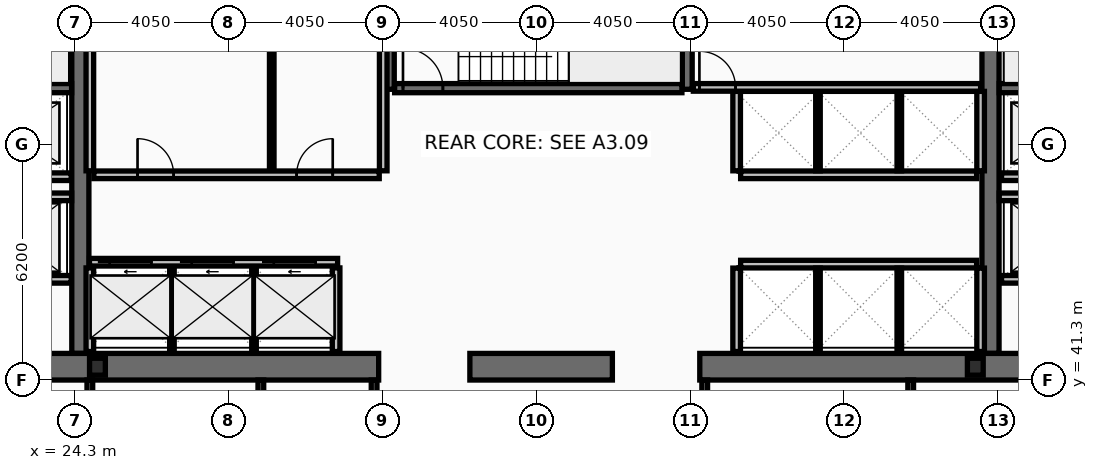
"""IFC4 building model, lengths in metres.
Left out: names, types, materials, properties, quantities, classifications, styles, units other than length and angle.
Written with IfcOpenShell. Run it as: python <this file> out.ifc"""

import sys

from ifc_helpers import new_model, si_unit, direction, frame, frame_2d, origin, origin_2d, place, context, subcontext, project, spatial, rectangle, i_section, extrude, element, fill, save


model = new_model("IFC4")
c1 = context("Model", 3, precision=1e-05, world=origin(), true_north=direction((0.0, 1.0)))
c2 = subcontext(c1, "Body", "Model", "MODEL_VIEW")
j1 = project(units=[si_unit("LENGTHUNIT", "METRE"), si_unit("PLANEANGLEUNIT", "RADIAN")], contexts=[c1])
p1 = place(None, origin())
s1 = spatial("IfcSite", under=j1, at=p1, CompositionType="ELEMENT")
p2 = place(p1, origin())
s2 = spatial("IfcBuilding", under=s1, at=p2, CompositionType="ELEMENT")
p3 = place(p2, frame((0.0, 0.0, 165.0)))
s3 = spatial("IfcBuildingStorey", under=s2, at=p3, CompositionType="ELEMENT", Elevation=165.0)
for number, where, z_axis, x_axis in (
    (1, (24.45, 42.0, 0.0), (0.0, 0.0, 1.0), (0.0, 1.0, 0.0)),
    (2, (48.4, 42.0, 0.0), (0.0, 0.0, 1.0), (0.0, 1.0, 0.0)),
):
    element("IfcWall", number, at=place(p3, frame(where, z_axis=z_axis, x_axis=x_axis)), inside=s3, PredefinedType="SHEAR", context=c2, shape_type="SweptSolid", body=[
        extrude(rectangle(XDim=11.0, YDim=0.45, at=frame_2d((5.5, 0.0))), origin(), (0.0, 0.0, 1.0), 3.44),
    ])
p4 = place(p3, frame((32.3, 41.65, 0.0), z_axis=(0.0, 0.0, 1.0), x_axis=(-1.0, 0.0, 0.0)))
e3 = element("IfcWall", 3, at=p4, inside=s3, PredefinedType="SHEAR", context=c2, shape_type="SweptSolid", body=[
    extrude(rectangle(XDim=11.45, YDim=0.7, at=frame_2d((5.725, 0.0))), origin(), (0.0, 0.0, 1.0), 3.44),
])
p5 = place(p3, frame((38.45, 41.65, 0.0), z_axis=(0.0, 0.0, 1.0), x_axis=(-1.0, 0.0, 0.0)))
e4 = element("IfcWall", 4, at=p5, inside=s3, PredefinedType="SHEAR", context=c2, shape_type="SweptSolid", body=[
    extrude(rectangle(XDim=3.75, YDim=0.7, at=frame_2d((1.875, 0.0))), origin(), (0.0, 0.0, 1.0), 3.44),
])
p6 = place(p3, frame((52.05, 41.65, 0.0), z_axis=(0.0, 0.0, 1.0), x_axis=(-1.0, 0.0, 0.0)))
e5 = element("IfcWall", 5, at=p6, inside=s3, PredefinedType="SHEAR", context=c2, shape_type="SweptSolid", body=[
    extrude(rectangle(XDim=11.3, YDim=0.7, at=frame_2d((5.65, 0.0))), origin(), (0.0, 0.0, 1.0), 3.44),
])
for number, where, z_axis, x_axis in (
    (6, (32.58, 48.95, 0.0), (0.0, 0.0, 1.0), (0.0, 1.0, 0.0)),
    (7, (40.42, 48.95, 0.0), (0.0, 0.0, 1.0), (0.0, 1.0, 0.0)),
):
    element("IfcWall", number, at=place(p3, frame(where, z_axis=z_axis, x_axis=x_axis)), inside=s3, PredefinedType="SHEAR", context=c2, shape_type="SweptSolid", body=[
        extrude(rectangle(XDim=4.05, YDim=0.26, at=frame_2d((2.025, 0.0))), origin(), (0.0, 0.0, 1.0), 3.44),
    ])
p7 = place(p3, frame((16.9, 48.98, 0.0), z_axis=(0.0, 0.0, 1.0), x_axis=(1.0, 0.0, 0.0)))
e8 = element("IfcWall", 8, at=p7, inside=s3, PredefinedType="SHEAR", context=c2, shape_type="SweptSolid", body=[
    extrude(rectangle(XDim=7.32, YDim=0.24, at=frame_2d((3.66, 0.0))), origin(), (0.0, 0.0, 1.0), 3.44),
])
p8 = place(p7, frame((0.22, 0.0, 0.0)))
e9 = element("IfcOpeningElement", 9, at=p8, cuts=e8, PredefinedType="OPENING", context=c2, shape_type="SweptSolid", body=[
    extrude(rectangle(XDim=1.05, YDim=2.15, at=frame_2d((0.525, 1.075))), frame((0.0, 0.13, 0.0), z_axis=(0.0, -1.0, 0.0), x_axis=(1.0, 0.0, 0.0)), (0.0, 0.0, 1.0), 0.26),
])
p9 = place(p3, frame((48.63, 48.98, 0.0), z_axis=(0.0, 0.0, 1.0), x_axis=(1.0, 0.0, 0.0)))
e10 = element("IfcWall", 10, at=p9, inside=s3, PredefinedType="SHEAR", context=c2, shape_type="SweptSolid", body=[
    extrude(rectangle(XDim=7.37, YDim=0.24, at=frame_2d((3.685, 0.0))), origin(), (0.0, 0.0, 1.0), 3.44),
])
p10 = place(p9, frame((6.1, 0.0, 0.0)))
e11 = element("IfcOpeningElement", 11, at=p10, cuts=e10, PredefinedType="OPENING", context=c2, shape_type="SweptSolid", body=[
    extrude(rectangle(XDim=1.05, YDim=2.15, at=frame_2d((0.525, 1.075))), frame((0.0, 0.13, 0.0), z_axis=(0.0, -1.0, 0.0), x_axis=(1.0, 0.0, 0.0)), (0.0, 0.0, 1.0), 0.26),
])
p11 = place(p3, frame((32.72, 48.98, 0.0), z_axis=(0.0, 0.0, 1.0), x_axis=(1.0, 0.0, 0.0)))
e12 = element("IfcWall", 12, at=p11, inside=s3, PredefinedType="SHEAR", context=c2, shape_type="SweptSolid", body=[
    extrude(rectangle(XDim=7.56, YDim=0.24, at=frame_2d((3.78, 0.0))), origin(), (0.0, 0.0, 1.0), 3.44),
])
p12 = place(p11, frame((0.22, 0.0, 0.0)))
e13 = element("IfcOpeningElement", 13, at=p12, cuts=e12, PredefinedType="OPENING", context=c2, shape_type="SweptSolid", body=[
    extrude(rectangle(XDim=1.05, YDim=2.15, at=frame_2d((0.525, 1.075))), frame((0.0, 0.13, 0.0), z_axis=(0.0, -1.0, 0.0), x_axis=(1.0, 0.0, 0.0)), (0.0, 0.0, 1.0), 0.26),
])
for number, where, z_axis, x_axis in (
    (14, (24.9, 41.65, 0.0), (0.0, 0.0, 1.0), (1.0, 0.0, 0.0)),
    (15, (48.0, 41.65, 0.0), (0.0, 0.0, 1.0), (1.0, 0.0, 0.0)),
):
    element("IfcColumn", number, at=place(p3, frame(where, z_axis=z_axis, x_axis=x_axis)), inside=s3, PredefinedType="COLUMN", context=c2, shape_type="SweptSolid", body=[
        extrude(i_section(OverallWidth=0.416, OverallDepth=0.446, WebThickness=0.039, FlangeThickness=0.063, at=origin_2d()), origin(), (0.0, 0.0, 1.0), 3.6),
    ])
p13 = place(p3, frame((24.69, 44.4, 0.0), z_axis=(0.0, 0.0, 1.0), x_axis=(1.0, 0.0, 0.0)))
e16 = element("IfcWall", 16, at=p13, inside=s3, PredefinedType="PARTITIONING", context=c2, shape_type="SweptSolid", body=[
    extrude(rectangle(XDim=6.53, YDim=0.2, at=frame_2d((3.265, 0.0))), origin(), (0.0, 0.0, 1.0), 3.44),
])
p14 = place(p13, frame((0.53, 0.0, 0.0)))
e17 = element("IfcOpeningElement", 17, at=p14, cuts=e16, PredefinedType="OPENING", context=c2, shape_type="SweptSolid", body=[
    extrude(rectangle(XDim=1.1, YDim=2.18, at=frame_2d((0.55, 1.09))), frame((0.0, 0.11, 0.0), z_axis=(0.0, -1.0, 0.0), x_axis=(1.0, 0.0, 0.0)), (0.0, 0.0, 1.0), 0.22),
])
p15 = place(p13, frame((2.69, 0.0, 0.0)))
e18 = element("IfcOpeningElement", 18, at=p15, cuts=e16, PredefinedType="OPENING", context=c2, shape_type="SweptSolid", body=[
    extrude(rectangle(XDim=1.1, YDim=2.18, at=frame_2d((0.55, 1.09))), frame((0.0, 0.11, 0.0), z_axis=(0.0, -1.0, 0.0), x_axis=(1.0, 0.0, 0.0)), (0.0, 0.0, 1.0), 0.22),
])
p16 = place(p13, frame((4.85, 0.0, 0.0)))
e19 = element("IfcOpeningElement", 19, at=p16, cuts=e16, PredefinedType="OPENING", context=c2, shape_type="SweptSolid", body=[
    extrude(rectangle(XDim=1.1, YDim=2.18, at=frame_2d((0.55, 1.09))), frame((0.0, 0.11, 0.0), z_axis=(0.0, -1.0, 0.0), x_axis=(1.0, 0.0, 0.0)), (0.0, 0.0, 1.0), 0.22),
])
p17 = place(p3, frame((51.61, 43.95, 0.0), z_axis=(0.0, 0.0, 1.0), x_axis=(-1.0, 0.0, 0.0)))
e20 = element("IfcWall", 20, at=p17, inside=s3, PredefinedType="PARTITIONING", context=c2, shape_type="SweptSolid", body=[
    extrude(rectangle(XDim=2.92, YDim=0.2, at=frame_2d((1.46, 0.0))), origin(), (0.0, 0.0, 1.0), 3.44),
])
p18 = place(p17, frame((0.81, 0.0, 0.0)))
e21 = element("IfcOpeningElement", 21, at=p18, cuts=e20, PredefinedType="OPENING", context=c2, shape_type="SweptSolid", body=[
    extrude(rectangle(XDim=1.3, YDim=2.18, at=frame_2d((0.65, 1.09))), frame((0.0, 0.11, 0.0), z_axis=(0.0, -1.0, 0.0), x_axis=(1.0, 0.0, 0.0)), (0.0, 0.0, 1.0), 0.22),
])
p19 = place(p3, frame((24.21, 43.95, 0.0), z_axis=(0.0, 0.0, 1.0), x_axis=(-1.0, 0.0, 0.0)))
e22 = element("IfcWall", 22, at=p19, inside=s3, PredefinedType="PARTITIONING", context=c2, shape_type="SweptSolid", body=[
    extrude(rectangle(XDim=2.97, YDim=0.2, at=frame_2d((1.485, 0.0))), origin(), (0.0, 0.0, 1.0), 3.44),
])
p20 = place(p19, frame((0.86, 0.0, 0.0)))
e23 = element("IfcOpeningElement", 23, at=p20, cuts=e22, PredefinedType="OPENING", context=c2, shape_type="SweptSolid", body=[
    extrude(rectangle(XDim=1.3, YDim=2.18, at=frame_2d((0.65, 1.09))), frame((0.0, 0.11, 0.0), z_axis=(0.0, -1.0, 0.0), x_axis=(1.0, 0.0, 0.0)), (0.0, 0.0, 1.0), 0.22),
])
p21 = place(p3, frame((51.61, 46.65, 0.0), z_axis=(0.0, 0.0, 1.0), x_axis=(-1.0, 0.0, 0.0)))
e24 = element("IfcWall", 24, at=p21, inside=s3, PredefinedType="PARTITIONING", context=c2, shape_type="SweptSolid", body=[
    extrude(rectangle(XDim=2.92, YDim=0.2, at=frame_2d((1.46, 0.0))), origin(), (0.0, 0.0, 1.0), 3.44),
])
p22 = place(p21, frame((0.86, 0.0, 0.0)))
e25 = element("IfcOpeningElement", 25, at=p22, cuts=e24, PredefinedType="OPENING", context=c2, shape_type="SweptSolid", body=[
    extrude(rectangle(XDim=1.2, YDim=2.18, at=frame_2d((0.6, 1.09))), frame((0.0, 0.11, 0.0), z_axis=(0.0, -1.0, 0.0), x_axis=(1.0, 0.0, 0.0)), (0.0, 0.0, 1.0), 0.22),
])
p23 = place(p3, frame((24.21, 46.65, 0.0), z_axis=(0.0, 0.0, 1.0), x_axis=(-1.0, 0.0, 0.0)))
e26 = element("IfcWall", 26, at=p23, inside=s3, PredefinedType="PARTITIONING", context=c2, shape_type="SweptSolid", body=[
    extrude(rectangle(XDim=2.97, YDim=0.2, at=frame_2d((1.485, 0.0))), origin(), (0.0, 0.0, 1.0), 3.44),
])
p24 = place(p23, frame((0.91, 0.0, 0.0)))
e27 = element("IfcOpeningElement", 27, at=p24, cuts=e26, PredefinedType="OPENING", context=c2, shape_type="SweptSolid", body=[
    extrude(rectangle(XDim=1.2, YDim=2.18, at=frame_2d((0.6, 1.09))), frame((0.0, 0.11, 0.0), z_axis=(0.0, -1.0, 0.0), x_axis=(1.0, 0.0, 0.0)), (0.0, 0.0, 1.0), 0.22),
])
p25 = place(p3, frame((21.2, 46.12, 0.0), z_axis=(0.0, 0.0, 1.0), x_axis=(1.0, 0.0, 0.0)))
e28 = element("IfcWall", 28, at=p25, inside=s3, PredefinedType="PARTITIONING", context=c2, shape_type="SweptSolid", body=[
    extrude(rectangle(XDim=3.02, YDim=0.2, at=frame_2d((1.51, 0.0))), origin(), (0.0, 0.0, 1.0), 3.44),
])
p26 = place(p3, frame((48.63, 46.12, 0.0), z_axis=(0.0, 0.0, 1.0), x_axis=(1.0, 0.0, 0.0)))
e29 = element("IfcWall", 29, at=p26, inside=s3, PredefinedType="PARTITIONING", context=c2, shape_type="SweptSolid", body=[
    extrude(rectangle(XDim=3.07, YDim=0.2, at=frame_2d((1.535, 0.0))), origin(), (0.0, 0.0, 1.0), 3.44),
])
for number, where, z_axis, x_axis in (
    (30, (24.7, 46.805, 0.0), (0.0, 0.0, 1.0), (0.0, 1.0, 0.0)),
    (31, (32.42, 46.805, 0.0), (0.0, 0.0, 1.0), (0.0, 1.0, 0.0)),
):
    element("IfcWall", number, at=place(p3, frame(where, z_axis=z_axis, x_axis=x_axis)), inside=s3, PredefinedType="PARTITIONING", context=c2, shape_type="SweptSolid", body=[
        extrude(rectangle(XDim=5.99, YDim=0.2, at=frame_2d((2.995, 0.0))), origin(), (0.0, 0.0, 1.0), 3.44),
    ])
p27 = place(p3, frame((29.486, 46.805, 0.0), z_axis=(0.0, 0.0, 1.0), x_axis=(0.0, 1.0, 0.0)))
e32 = element("IfcWall", 32, at=p27, inside=s3, PredefinedType="PARTITIONING", context=c2, shape_type="SweptSolid", body=[
    extrude(rectangle(XDim=5.99, YDim=0.12, at=frame_2d((2.995, 0.0))), origin(), (0.0, 0.0, 1.0), 3.44),
])
p28 = place(p3, frame((24.805, 46.7, 0.0), z_axis=(0.0, 0.0, 1.0), x_axis=(1.0, 0.0, 0.0)))
e33 = element("IfcWall", 33, at=p28, inside=s3, PredefinedType="PARTITIONING", context=c2, shape_type="SweptSolid", body=[
    extrude(rectangle(XDim=7.51, YDim=0.2, at=frame_2d((3.755, 0.0))), origin(), (0.0, 0.0, 1.0), 3.44),
])
p29 = place(p28, frame((1.15, 0.0, 0.0)))
e34 = element("IfcOpeningElement", 34, at=p29, cuts=e33, PredefinedType="OPENING", context=c2, shape_type="SweptSolid", body=[
    extrude(rectangle(XDim=0.95, YDim=2.1, at=frame_2d((0.475, 1.05))), frame((0.0, 0.11, 0.0), z_axis=(0.0, -1.0, 0.0), x_axis=(1.0, 0.0, 0.0)), (0.0, 0.0, 1.0), 0.22),
])
p30 = place(p28, frame((5.336, 0.0, 0.0)))
e35 = element("IfcOpeningElement", 35, at=p30, cuts=e33, PredefinedType="OPENING", context=c2, shape_type="SweptSolid", body=[
    extrude(rectangle(XDim=0.95, YDim=2.1, at=frame_2d((0.475, 1.05))), frame((0.0, 0.11, 0.0), z_axis=(0.0, -1.0, 0.0), x_axis=(1.0, 0.0, 0.0)), (0.0, 0.0, 1.0), 0.22),
])
for number, where, z_axis, x_axis in (
    (36, (24.7, 42.05, 0.0), (0.0, 0.0, 1.0), (0.0, 1.0, 0.0)),
    (37, (31.18, 42.05, 0.0), (0.0, 0.0, 1.0), (0.0, 1.0, 0.0)),
):
    element("IfcWall", number, at=place(p3, frame(where, z_axis=z_axis, x_axis=x_axis)), inside=s3, PredefinedType="PARTITIONING", context=c2, shape_type="SweptSolid", body=[
        extrude(rectangle(XDim=2.2, YDim=0.2, at=frame_2d((1.1, 0.0))), origin(), (0.0, 0.0, 1.0), 3.44),
    ])
for number, where, z_axis, x_axis in (
    (38, (26.86, 42.05, 0.0), (0.0, 0.0, 1.0), (0.0, 1.0, 0.0)),
    (39, (29.02, 42.05, 0.0), (0.0, 0.0, 1.0), (0.0, 1.0, 0.0)),
):
    element("IfcWall", number, at=place(p3, frame(where, z_axis=z_axis, x_axis=x_axis)), inside=s3, PredefinedType="PARTITIONING", context=c2, shape_type="SweptSolid", body=[
        extrude(rectangle(XDim=2.2, YDim=0.12, at=frame_2d((1.1, 0.0))), origin(), (0.0, 0.0, 1.0), 3.44),
    ])
p31 = place(p3, frame((41.825, 46.7, 0.0), z_axis=(0.0, 0.0, 1.0), x_axis=(1.0, 0.0, 0.0)))
e40 = element("IfcWall", 40, at=p31, inside=s3, PredefinedType="PARTITIONING", context=c2, shape_type="SweptSolid", body=[
    extrude(rectangle(XDim=6.21, YDim=0.2, at=frame_2d((3.105, 0.0))), origin(), (0.0, 0.0, 1.0), 3.44),
])
for number, where, z_axis, x_axis in (
    (41, (41.72, 46.805, 0.0), (0.0, 0.0, 1.0), (0.0, 1.0, 0.0)),
    (42, (48.14, 46.805, 0.0), (0.0, 0.0, 1.0), (0.0, 1.0, 0.0)),
):
    element("IfcWall", number, at=place(p3, frame(where, z_axis=z_axis, x_axis=x_axis)), inside=s3, PredefinedType="PARTITIONING", context=c2, shape_type="SweptSolid", body=[
        extrude(rectangle(XDim=2.09, YDim=0.2, at=frame_2d((1.045, 0.0))), origin(), (0.0, 0.0, 1.0), 3.44),
    ])
for number, where, z_axis, x_axis in (
    (43, (43.86, 46.805, 0.0), (0.0, 0.0, 1.0), (0.0, 1.0, 0.0)),
    (44, (46.0, 46.805, 0.0), (0.0, 0.0, 1.0), (0.0, 1.0, 0.0)),
):
    element("IfcWall", number, at=place(p3, frame(where, z_axis=z_axis, x_axis=x_axis)), inside=s3, PredefinedType="PARTITIONING", context=c2, shape_type="SweptSolid", body=[
        extrude(rectangle(XDim=2.09, YDim=0.12, at=frame_2d((1.045, 0.0))), origin(), (0.0, 0.0, 1.0), 3.44),
    ])
p32 = place(p3, frame((41.825, 44.35, 0.0), z_axis=(0.0, 0.0, 1.0), x_axis=(1.0, 0.0, 0.0)))
e45 = element("IfcWall", 45, at=p32, inside=s3, PredefinedType="PARTITIONING", context=c2, shape_type="SweptSolid", body=[
    extrude(rectangle(XDim=6.21, YDim=0.2, at=frame_2d((3.105, 0.0))), origin(), (0.0, 0.0, 1.0), 3.44),
])
for number, where, z_axis, x_axis in (
    (46, (41.72, 42.05, 0.0), (0.0, 0.0, 1.0), (0.0, 1.0, 0.0)),
    (47, (48.14, 42.05, 0.0), (0.0, 0.0, 1.0), (0.0, 1.0, 0.0)),
):
    element("IfcWall", number, at=place(p3, frame(where, z_axis=z_axis, x_axis=x_axis)), inside=s3, PredefinedType="PARTITIONING", context=c2, shape_type="SweptSolid", body=[
        extrude(rectangle(XDim=2.195, YDim=0.2, at=frame_2d((1.098, 0.0))), origin(), (0.0, 0.0, 1.0), 3.44),
    ])
for number, where, z_axis, x_axis in (
    (48, (43.86, 42.05, 0.0), (0.0, 0.0, 1.0), (0.0, 1.0, 0.0)),
    (49, (46.0, 42.05, 0.0), (0.0, 0.0, 1.0), (0.0, 1.0, 0.0)),
):
    element("IfcWall", number, at=place(p3, frame(where, z_axis=z_axis, x_axis=x_axis)), inside=s3, PredefinedType="PARTITIONING", context=c2, shape_type="SweptSolid", body=[
        extrude(rectangle(XDim=2.195, YDim=0.12, at=frame_2d((1.098, 0.0))), origin(), (0.0, 0.0, 1.0), 3.44),
    ])
p33 = place(p3, frame((40.58, 49.0, 0.0), z_axis=(0.0, 0.0, 1.0), x_axis=(1.0, 0.0, 0.0)))
e50 = element("IfcWall", 50, at=p33, inside=s3, PredefinedType="PARTITIONING", context=c2, shape_type="SweptSolid", body=[
    extrude(rectangle(XDim=7.56, YDim=0.2, at=frame_2d((3.78, 0.0))), origin(), (0.0, 0.0, 1.0), 3.44),
])
p34 = place(p33, frame((0.16, 0.0, 0.0)))
e51 = element("IfcOpeningElement", 51, at=p34, cuts=e50, PredefinedType="OPENING", context=c2, shape_type="SweptSolid", body=[
    extrude(rectangle(XDim=0.95, YDim=2.1, at=frame_2d((0.475, 1.05))), frame((0.0, 0.11, 0.0), z_axis=(0.0, -1.0, 0.0), x_axis=(1.0, 0.0, 0.0)), (0.0, 0.0, 1.0), 0.22),
])
p35 = place(p3, frame((24.7, 38.28, 0.0), z_axis=(0.0, 0.0, 1.0), x_axis=(0.0, 1.0, 0.0)))
e52 = element("IfcWall", 52, at=p35, inside=s3, PredefinedType="PARTITIONING", context=c2, shape_type="SweptSolid", body=[
    extrude(rectangle(XDim=3.02, YDim=0.15, at=frame_2d((1.51, 0.0))), origin(), (0.0, 0.0, 1.0), 2.73),
])
for number, where, z_axis, x_axis in (
    (53, (29.2, 38.28, 0.0), (0.0, 0.0, 1.0), (0.0, 1.0, 0.0)),
    (54, (32.18, 38.28, 0.0), (0.0, 0.0, 1.0), (0.0, 1.0, 0.0)),
    (55, (40.88, 38.28, 0.0), (0.0, 0.0, 1.0), (0.0, 1.0, 0.0)),
    (56, (46.3, 38.28, 0.0), (0.0, 0.0, 1.0), (0.0, 1.0, 0.0)),
):
    element("IfcWall", number, at=place(p3, frame(where, z_axis=z_axis, x_axis=x_axis)), inside=s3, PredefinedType="PARTITIONING", context=c2, shape_type="SweptSolid", body=[
        extrude(rectangle(XDim=3.02, YDim=0.15, at=frame_2d((1.51, 0.0))), origin(), (0.0, 0.0, 1.0), 3.44),
    ])
p36 = place(p12, origin())
e57 = element("IfcDoor", 57, at=p36, inside=s3, OperationType="SINGLE_SWING_LEFT", PredefinedType="DOOR", context=c2, shape_type="SweptSolid", body=[
    extrude(rectangle(XDim=1.05, YDim=2.15, at=frame_2d((0.525, 1.075))), frame((0.0, 0.025, 0.0), z_axis=(0.0, -1.0, 0.0), x_axis=(1.0, 0.0, 0.0)), (0.0, 0.0, 1.0), 0.05),
])
fill(e13, e57)
p37 = place(p14, origin())
e58 = element("IfcDoor", 58, at=p37, inside=s3, OperationType="SLIDING_TO_LEFT", PredefinedType="DOOR", context=c2, shape_type="SweptSolid", body=[
    extrude(rectangle(XDim=1.1, YDim=2.18, at=frame_2d((0.55, 1.09))), frame((0.0, 0.025, 0.0), z_axis=(0.0, -1.0, 0.0), x_axis=(1.0, 0.0, 0.0)), (0.0, 0.0, 1.0), 0.05),
])
fill(e17, e58)
p38 = place(p15, origin())
e59 = element("IfcDoor", 59, at=p38, inside=s3, OperationType="SLIDING_TO_LEFT", PredefinedType="DOOR", context=c2, shape_type="SweptSolid", body=[
    extrude(rectangle(XDim=1.1, YDim=2.18, at=frame_2d((0.55, 1.09))), frame((0.0, 0.025, 0.0), z_axis=(0.0, -1.0, 0.0), x_axis=(1.0, 0.0, 0.0)), (0.0, 0.0, 1.0), 0.05),
])
fill(e18, e59)
p39 = place(p16, origin())
e60 = element("IfcDoor", 60, at=p39, inside=s3, OperationType="SLIDING_TO_LEFT", PredefinedType="DOOR", context=c2, shape_type="SweptSolid", body=[
    extrude(rectangle(XDim=1.1, YDim=2.18, at=frame_2d((0.55, 1.09))), frame((0.0, 0.025, 0.0), z_axis=(0.0, -1.0, 0.0), x_axis=(1.0, 0.0, 0.0)), (0.0, 0.0, 1.0), 0.05),
])
fill(e19, e60)
p40 = place(p29, origin())
e61 = element("IfcDoor", 61, at=p40, inside=s3, OperationType="SINGLE_SWING_LEFT", PredefinedType="DOOR", context=c2, shape_type="SweptSolid", body=[
    extrude(rectangle(XDim=0.95, YDim=2.1, at=frame_2d((0.475, 1.05))), frame((0.0, 0.025, 0.0), z_axis=(0.0, -1.0, 0.0), x_axis=(1.0, 0.0, 0.0)), (0.0, 0.0, 1.0), 0.05),
])
fill(e34, e61)
p41 = place(p30, origin())
e62 = element("IfcDoor", 62, at=p41, inside=s3, OperationType="SINGLE_SWING_RIGHT", PredefinedType="DOOR", context=c2, shape_type="SweptSolid", body=[
    extrude(rectangle(XDim=0.95, YDim=2.1, at=frame_2d((0.475, 1.05))), frame((0.0, 0.025, 0.0), z_axis=(0.0, -1.0, 0.0), x_axis=(1.0, 0.0, 0.0)), (0.0, 0.0, 1.0), 0.05),
])
fill(e35, e62)
p42 = place(p34, origin())
e63 = element("IfcDoor", 63, at=p42, inside=s3, OperationType="SINGLE_SWING_LEFT", PredefinedType="DOOR", context=c2, shape_type="SweptSolid", body=[
    extrude(rectangle(XDim=0.95, YDim=2.1, at=frame_2d((0.475, 1.05))), frame((0.0, 0.025, 0.0), z_axis=(0.0, -1.0, 0.0), x_axis=(1.0, 0.0, 0.0)), (0.0, 0.0, 1.0), 0.05),
])
fill(e51, e63)
save(model, sys.argv[1])
